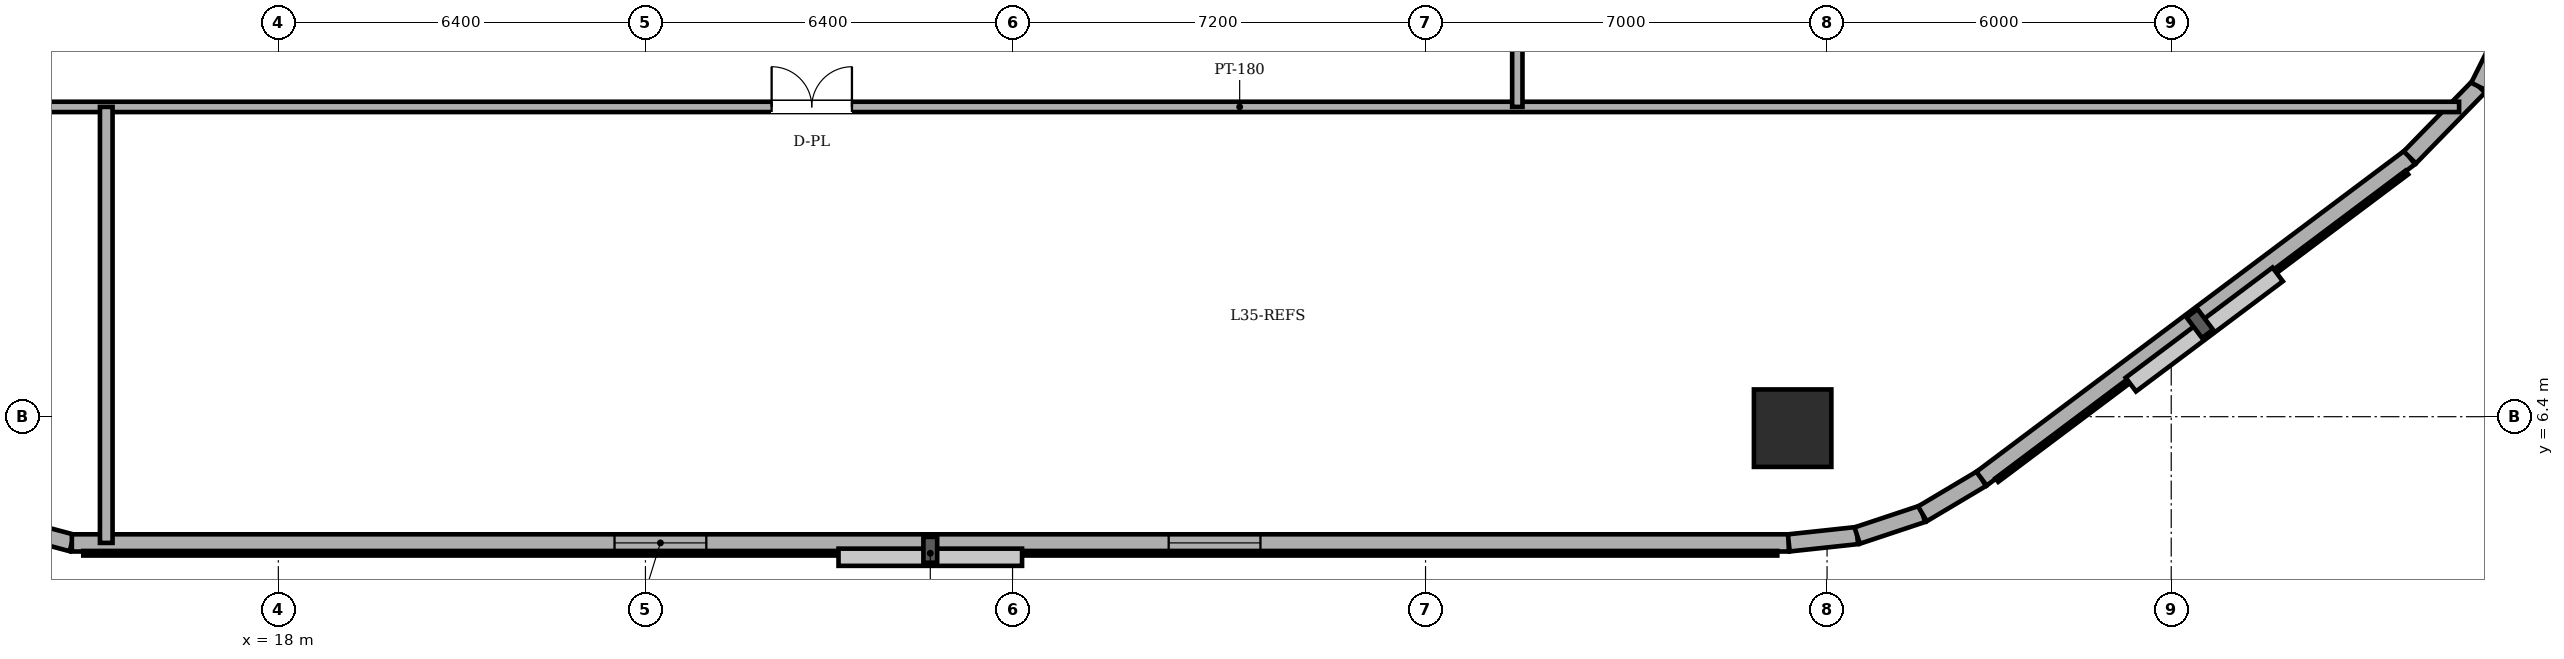
"""IFC4 building model, lengths in metres.
Left out: names, types, materials, properties, quantities, classifications, styles, units other than length and angle.
Written with IfcOpenShell. Run it as: python <this file> out.ifc"""

import sys

from ifc_helpers import new_model, si_unit, direction, frame, frame_2d, origin, origin_2d, place, context, subcontext, project, spatial, rectangle, circle, extrude, element, fill, save


model = new_model("IFC4")
c1 = context("Model", 3, precision=1e-05, world=origin(), true_north=direction((0.0, 1.0)))
c2 = subcontext(c1, "Body", "Model", "MODEL_VIEW")
j1 = project(units=[si_unit("LENGTHUNIT", "METRE"), si_unit("PLANEANGLEUNIT", "RADIAN")], contexts=[c1])
p1 = place(None, origin())
s1 = spatial("IfcSite", under=j1, at=p1, CompositionType="ELEMENT")
p2 = place(p1, origin())
s2 = spatial("IfcBuilding", under=s1, at=p2, CompositionType="ELEMENT")
p3 = place(p2, frame((0.0, 0.0, 133.1)))
s3 = spatial("IfcBuildingStorey", under=s2, at=p3, CompositionType="ELEMENT", Elevation=133.1)
p4 = place(p3, frame((44.4, 6.2, 0.0), z_axis=(0.0, 0.0, 1.0), x_axis=(1.0, 0.0, 0.0)))
e1 = element("IfcColumn", 1, at=p4, inside=s3, PredefinedType="COLUMN", context=c2, shape_type="SweptSolid", body=[
    extrude(circle(Radius=0.675, at=origin_2d()), origin(), (0.0, 0.0, 1.0), 2.96),
])
p5 = place(p3, frame((11.6, 4.95, 0.0), z_axis=(0.0, 0.0, 1.0), x_axis=(0.965943540406, -0.258752926066, 0.0)))
e2 = element("IfcWall", 2, at=p5, inside=s3, PredefinedType="SOLIDWALL", context=c2, shape_type="SweptSolid", body=[
    extrude(rectangle(XDim=2.898, YDim=0.3, at=frame_2d((1.449, 0.0))), origin(), (0.0, 0.0, 1.0), 5.36),
])
p6 = place(p3, frame((14.4, 4.2, 0.0), z_axis=(0.0, 0.0, 1.0), x_axis=(1.0, 0.0, 0.0)))
e3 = element("IfcWall", 3, at=p6, inside=s3, PredefinedType="SOLIDWALL", context=c2, shape_type="SweptSolid", body=[
    extrude(rectangle(XDim=29.933, YDim=0.3, at=frame_2d((14.967, 0.0))), origin(), (0.0, 0.0, 1.0), 5.36),
])
p7 = place(p6, frame((9.461, 0.0, 0.85)))
e4 = element("IfcOpeningElement", 4, at=p7, cuts=e3, PredefinedType="OPENING", context=c2, shape_type="SweptSolid", body=[
    extrude(rectangle(XDim=1.6, YDim=1.2, at=frame_2d((0.8, 0.6))), frame((0.0, 0.16, 0.0), z_axis=(0.0, -1.0, 0.0), x_axis=(1.0, 0.0, 0.0)), (0.0, 0.0, 1.0), 0.32),
])
p8 = place(p6, frame((19.122, 0.0, 0.85)))
e5 = element("IfcOpeningElement", 5, at=p8, cuts=e3, PredefinedType="OPENING", context=c2, shape_type="SweptSolid", body=[
    extrude(rectangle(XDim=1.6, YDim=1.2, at=frame_2d((0.8, 0.6))), frame((0.0, 0.16, 0.0), z_axis=(0.0, -1.0, 0.0), x_axis=(1.0, 0.0, 0.0)), (0.0, 0.0, 1.0), 0.32),
])
p9 = place(p3, frame((44.333, 4.2, 0.0), z_axis=(0.0, 0.0, 1.0), x_axis=(0.994289103787, 0.106720092254, 0.0)))
e6 = element("IfcWall", 6, at=p9, inside=s3, PredefinedType="SOLIDWALL", context=c2, shape_type="SweptSolid", body=[
    extrude(rectangle(XDim=1.199, YDim=0.3, at=frame_2d((0.599, 0.0))), origin(), (0.0, 0.0, 1.0), 5.36),
])
p10 = place(p3, frame((45.525, 4.328, 0.0), z_axis=(0.0, 0.0, 1.0), x_axis=(0.948744332129, 0.316044604847, 0.0)))
e7 = element("IfcWall", 7, at=p10, inside=s3, PredefinedType="SOLIDWALL", context=c2, shape_type="SweptSolid", body=[
    extrude(rectangle(XDim=1.2, YDim=0.3, at=frame_2d((0.6, 0.0))), origin(), (0.0, 0.0, 1.0), 5.36),
])
p11 = place(p3, frame((46.663, 4.707, 0.0), z_axis=(0.0, 0.0, 1.0), x_axis=(0.859320591642, 0.511437308749, 0.0)))
e8 = element("IfcWall", 8, at=p11, inside=s3, PredefinedType="SOLIDWALL", context=c2, shape_type="SweptSolid", body=[
    extrude(rectangle(XDim=1.199, YDim=0.3, at=frame_2d((0.599, 0.0))), origin(), (0.0, 0.0, 1.0), 5.36),
])
p12 = place(p3, frame((47.693, 5.32, 0.0), z_axis=(0.0, 0.0, 1.0), x_axis=(0.800012555607, 0.599983258826, 0.0)))
e9 = element("IfcWall", 9, at=p12, inside=s3, PredefinedType="SOLIDWALL", context=c2, shape_type="SweptSolid", body=[
    extrude(rectangle(XDim=9.333, YDim=0.3, at=frame_2d((4.667, 0.0))), origin(), (0.0, 0.0, 1.0), 5.36),
])
for number, where, z_axis, x_axis in (
    (10, (55.16, 10.92, 0.0), (0.0, 0.0, 1.0), (0.698, 0.716, 0.0)),
    (11, (56.364, 12.154, 0.0), (0.0, 0.0, 1.0), (0.447, 0.894, 0.0)),
):
    element("IfcWall", number, at=place(p3, frame(where, z_axis=z_axis, x_axis=x_axis)), inside=s3, PredefinedType="SOLIDWALL", context=c2, shape_type="SweptSolid", body=[
        extrude(rectangle(XDim=1.724, YDim=0.3, at=frame_2d((0.862, 0.0))), origin(), (0.0, 0.0, 1.0), 5.36),
    ])
p13 = place(p3, frame((13.5, 11.8, 0.0), z_axis=(0.0, 0.0, 1.0), x_axis=(1.0, 0.0, 0.0)))
e12 = element("IfcWall", 12, at=p13, inside=s3, PredefinedType="PARTITIONING", context=c2, shape_type="SweptSolid", body=[
    extrude(rectangle(XDim=42.519, YDim=0.18, at=frame_2d((21.26, 0.0))), origin(), (0.0, 0.0, 1.0), 5.36),
])
p14 = place(p13, frame((13.1, 0.0, 0.0)))
e13 = element("IfcOpeningElement", 13, at=p14, cuts=e12, PredefinedType="OPENING", context=c2, shape_type="SweptSolid", body=[
    extrude(rectangle(XDim=1.4, YDim=2.25, at=frame_2d((0.7, 1.125))), frame((0.0, 0.1, 0.0), z_axis=(0.0, -1.0, 0.0), x_axis=(1.0, 0.0, 0.0)), (0.0, 0.0, 1.0), 0.2),
])
p15 = place(p3, frame((15.0, 4.2, 0.0), z_axis=(0.0, 0.0, 1.0), x_axis=(0.0, 1.0, 0.0)))
e14 = element("IfcWall", 14, at=p15, inside=s3, PredefinedType="PARTITIONING", context=c2, shape_type="SweptSolid", body=[
    extrude(rectangle(XDim=7.6, YDim=0.22, at=frame_2d((3.8, 0.0))), origin(), (0.0, 0.0, 1.0), 5.36),
])
p16 = place(p3, frame((39.6, 11.8, 0.0), z_axis=(0.0, 0.0, 1.0), x_axis=(0.0, 1.0, 0.0)))
e15 = element("IfcWall", 15, at=p16, inside=s3, PredefinedType="PARTITIONING", context=c2, shape_type="SweptSolid", body=[
    extrude(rectangle(XDim=24.4, YDim=0.18, at=frame_2d((12.2, 0.0))), origin(), (0.0, 0.0, 1.0), 5.36),
])
p17 = place(p16, frame((18.07, 0.0, 0.0)))
e16 = element("IfcOpeningElement", 16, at=p17, cuts=e15, PredefinedType="OPENING", context=c2, shape_type="SweptSolid", body=[
    extrude(rectangle(XDim=1.4, YDim=2.25, at=frame_2d((0.7, 1.125))), frame((0.0, 0.1, 0.0), z_axis=(0.0, -1.0, 0.0), x_axis=(1.0, 0.0, 0.0)), (0.0, 0.0, 1.0), 0.2),
])
p18 = place(p16, frame((5.6, 0.0, 0.0)))
e17 = element("IfcOpeningElement", 17, at=p18, cuts=e15, PredefinedType="OPENING", context=c2, shape_type="SweptSolid", body=[
    extrude(rectangle(XDim=1.4, YDim=2.25, at=frame_2d((0.7, 1.125))), frame((0.0, 0.1, 0.0), z_axis=(0.0, -1.0, 0.0), x_axis=(1.0, 0.0, 0.0)), (0.0, 0.0, 1.0), 0.2),
])
p19 = place(p16, frame((9.7, 0.0, 0.0)))
e18 = element("IfcOpeningElement", 18, at=p19, cuts=e15, PredefinedType="OPENING", context=c2, shape_type="SweptSolid", body=[
    extrude(rectangle(XDim=1.4, YDim=2.25, at=frame_2d((0.7, 1.125))), frame((0.0, 0.1, 0.0), z_axis=(0.0, -1.0, 0.0), x_axis=(1.0, 0.0, 0.0)), (0.0, 0.0, 1.0), 0.2),
])
p20 = place(p7, origin())
e19 = element("IfcWindow", 19, at=p20, inside=s3, PartitioningType="DOUBLE_PANEL_VERTICAL", PredefinedType="WINDOW", context=c2, shape_type="SweptSolid", body=[
    extrude(rectangle(XDim=1.6, YDim=1.2, at=frame_2d((0.8, 0.6))), frame((0.0, 0.03, 0.0), z_axis=(0.0, -1.0, 0.0), x_axis=(1.0, 0.0, 0.0)), (0.0, 0.0, 1.0), 0.06),
])
fill(e4, e19)
p21 = place(p8, origin())
e20 = element("IfcWindow", 20, at=p21, inside=s3, PartitioningType="DOUBLE_PANEL_VERTICAL", PredefinedType="WINDOW", context=c2, shape_type="SweptSolid", body=[
    extrude(rectangle(XDim=1.6, YDim=1.2, at=frame_2d((0.8, 0.6))), frame((0.0, 0.03, 0.0), z_axis=(0.0, -1.0, 0.0), x_axis=(1.0, 0.0, 0.0)), (0.0, 0.0, 1.0), 0.06),
])
fill(e5, e20)
p22 = place(p14, origin())
e21 = element("IfcDoor", 21, at=p22, inside=s3, OperationType="DOUBLE_DOOR_SINGLE_SWING", PredefinedType="DOOR", context=c2, shape_type="SweptSolid", body=[
    extrude(rectangle(XDim=1.4, YDim=2.25, at=frame_2d((0.7, 1.125))), frame((0.0, 0.025, 0.0), z_axis=(0.0, -1.0, 0.0), x_axis=(1.0, 0.0, 0.0)), (0.0, 0.0, 1.0), 0.05),
])
fill(e13, e21)
save(model, sys.argv[1])
